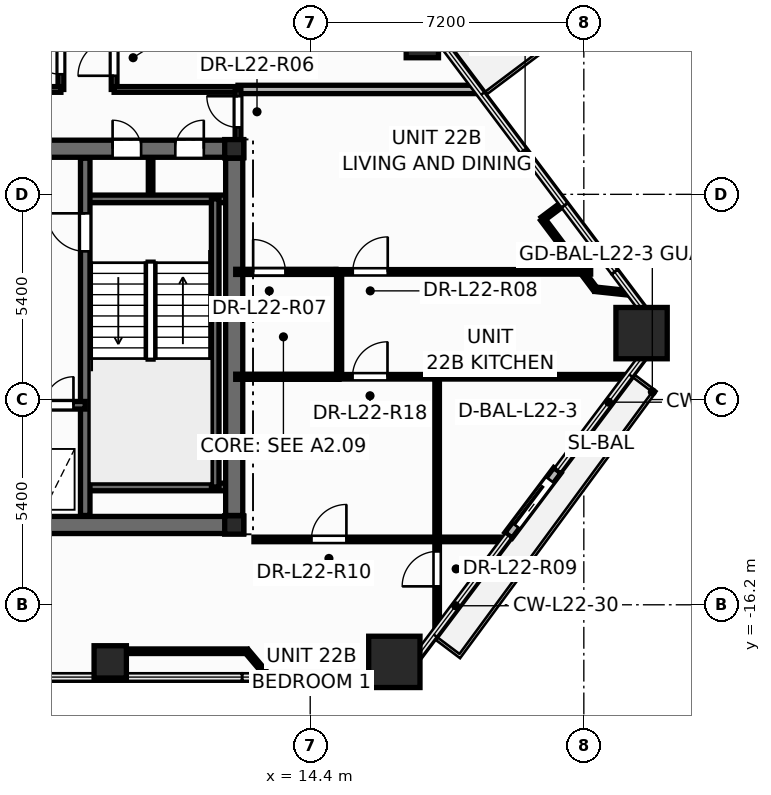
"""IFC4 building model, lengths in metres.
Left out: names, types, materials, properties, quantities, classifications, styles, units other than length and angle.
Written with IfcOpenShell. Run it as: python <this file> out.ifc"""

import sys

from ifc_helpers import new_model, si_unit, direction, frame, frame_2d, origin, origin_2d, place, context, subcontext, project, spatial, rectangle, hollow_rectangle, hollow_circle, i_section, extrude, element, fill, save


model = new_model("IFC4")
c1 = context("Model", 3, precision=1e-05, world=origin(), true_north=direction((0.0, 1.0)))
c2 = subcontext(c1, "Body", "Model", "MODEL_VIEW")
j1 = project(units=[si_unit("LENGTHUNIT", "METRE"), si_unit("PLANEANGLEUNIT", "RADIAN")], contexts=[c1])
p1 = place(None, origin())
s1 = spatial("IfcSite", under=j1, at=p1, CompositionType="ELEMENT")
p2 = place(p1, origin())
s2 = spatial("IfcBuilding", under=s1, at=p2, CompositionType="ELEMENT")
p3 = place(p2, frame((0.0, 0.0, 86.4)))
s3 = spatial("IfcBuildingStorey", under=s2, at=p3, CompositionType="ELEMENT", Elevation=86.4)
for number, where, z_axis, x_axis in (
    (1, (16.614, -17.702, 0.0), (0.0, 0.0, 1.0), (1.0, 0.0, 0.0)),
    (2, (23.119, -9.052, 0.0), (0.0, 0.0, 1.0), (1.0, 0.0, 0.0)),
):
    element("IfcColumn", number, at=place(p3, frame(where, z_axis=z_axis, x_axis=x_axis)), inside=s3, PredefinedType="COLUMN", context=c2, shape_type="SweptSolid", body=[
        extrude(hollow_rectangle(XDim=1.35, YDim=1.35, WallThickness=0.065, at=origin_2d()), origin(), (0.0, 0.0, 1.0), 3.6),
    ])
for number, where, z_axis, x_axis in (
    (3, (9.138, -17.702, 0.0), (0.0, 0.0, 1.0), (1.0, 0.0, 0.0)),
    (4, (17.351, -1.381, 0.0), (0.0, 0.0, 1.0), (1.0, 0.0, 0.0)),
):
    element("IfcColumn", number, at=place(p3, frame(where, z_axis=z_axis, x_axis=x_axis)), inside=s3, PredefinedType="COLUMN", context=c2, shape_type="SweptSolid", body=[
        extrude(hollow_circle(Radius=0.425, WallThickness=0.038, at=origin_2d()), origin(), (0.0, 0.0, 1.0), 3.6),
    ])
for number, where, z_axis, x_axis in (
    (5, (12.4, -14.1, 0.0), (0.0, 0.0, 1.0), (1.0, 0.0, 0.0)),
    (6, (12.4, -4.2, 0.0), (0.0, 0.0, 1.0), (1.0, 0.0, 0.0)),
):
    element("IfcColumn", number, at=place(p3, frame(where, z_axis=z_axis, x_axis=x_axis)), inside=s3, PredefinedType="COLUMN", context=c2, shape_type="SweptSolid", body=[
        extrude(i_section(OverallWidth=0.5, OverallDepth=0.482, WebThickness=0.04, FlangeThickness=0.045, at=origin_2d()), origin(), (0.0, 0.0, 1.0), 3.6),
    ])
p4 = place(p3, frame((19.618, -14.372, -0.015), z_axis=(0.0, 0.0, 1.0), x_axis=(0.601112886626, 0.799164124277, 0.0)))
e7 = element("IfcWall", 7, at=p4, inside=s3, PredefinedType="STANDARD", context=c2, shape_type="SweptSolid", body=[
    extrude(rectangle(XDim=2.14, YDim=0.24, at=frame_2d((1.07, 0.0))), origin(), (0.0, 0.0, 1.0), 2.658),
])
p5 = place(p4, frame((0.32, 0.0, 0.015)))
e8 = element("IfcOpeningElement", 8, at=p5, cuts=e7, PredefinedType="OPENING", context=c2, shape_type="SweptSolid", body=[
    extrude(rectangle(XDim=1.506, YDim=2.204, at=frame_2d((0.75, 1.102))), frame((0.0, 0.13, 0.0), z_axis=(0.0, -1.0, 0.0), x_axis=(1.0, 0.0, 0.0)), (0.0, 0.0, 1.0), 0.26),
])
p6 = place(p3, frame((10.2, -5.52, 0.0), z_axis=(0.0, 0.0, 1.0), x_axis=(0.0, 1.0, 0.0)))
e9 = element("IfcWall", 9, at=p6, inside=s3, PredefinedType="PARTITIONING", context=c2, shape_type="SweptSolid", body=[
    extrude(rectangle(XDim=1.12, YDim=0.12, at=frame_2d((0.56, 0.0))), origin(), (0.0, 0.0, 1.0), 3.28),
])
p7 = place(p3, frame((-12.65, -14.1, 0.0), z_axis=(0.0, 0.0, 1.0), x_axis=(1.0, 0.0, 0.0)))
e10 = element("IfcWall", 10, at=p7, inside=s3, PredefinedType="SHEAR", context=c2, shape_type="SweptSolid", body=[
    extrude(rectangle(XDim=25.3, YDim=0.45, at=frame_2d((12.65, 0.0))), origin(), (0.0, 0.0, 1.0), 3.6),
])
p8 = place(p3, frame((-12.65, -4.2, 0.0), z_axis=(0.0, 0.0, 1.0), x_axis=(1.0, 0.0, 0.0)))
e11 = element("IfcWall", 11, at=p8, inside=s3, PredefinedType="SHEAR", context=c2, shape_type="SweptSolid", body=[
    extrude(rectangle(XDim=25.3, YDim=0.45, at=frame_2d((12.65, 0.0))), origin(), (0.0, 0.0, 1.0), 3.6),
])
p9 = place(p8, frame((1.85, 0.0, 0.0)))
e12 = element("IfcOpeningElement", 12, at=p9, cuts=e11, PredefinedType="OPENING", context=c2, shape_type="SweptSolid", body=[
    extrude(rectangle(XDim=0.756, YDim=2.054, at=frame_2d((0.375, 1.027))), frame((0.0, 0.235, 0.0), z_axis=(0.0, -1.0, 0.0), x_axis=(1.0, 0.0, 0.0)), (0.0, 0.0, 1.0), 0.47),
])
p10 = place(p8, frame((21.85, 0.0, 0.0)))
e13 = element("IfcOpeningElement", 13, at=p10, cuts=e11, PredefinedType="OPENING", context=c2, shape_type="SweptSolid", body=[
    extrude(rectangle(XDim=0.756, YDim=2.054, at=frame_2d((0.375, 1.027))), frame((0.0, 0.235, 0.0), z_axis=(0.0, -1.0, 0.0), x_axis=(1.0, 0.0, 0.0)), (0.0, 0.0, 1.0), 0.47),
])
p11 = place(p8, frame((23.5, 0.0, 0.0)))
e14 = element("IfcOpeningElement", 14, at=p11, cuts=e11, PredefinedType="OPENING", context=c2, shape_type="SweptSolid", body=[
    extrude(rectangle(XDim=0.756, YDim=2.054, at=frame_2d((0.375, 1.027))), frame((0.0, 0.235, 0.0), z_axis=(0.0, -1.0, 0.0), x_axis=(1.0, 0.0, 0.0)), (0.0, 0.0, 1.0), 0.47),
])
p12 = place(p8, frame((5.85, 0.0, 0.0)))
e15 = element("IfcOpeningElement", 15, at=p12, cuts=e11, PredefinedType="OPENING", context=c2, shape_type="SweptSolid", body=[
    extrude(rectangle(XDim=1.006, YDim=2.104, at=frame_2d((0.5, 1.052))), frame((0.0, 0.235, 0.0), z_axis=(0.0, -1.0, 0.0), x_axis=(1.0, 0.0, 0.0)), (0.0, 0.0, 1.0), 0.47),
])
p13 = place(p8, frame((10.35, 0.0, 0.0)))
e16 = element("IfcOpeningElement", 16, at=p13, cuts=e11, PredefinedType="OPENING", context=c2, shape_type="SweptSolid", body=[
    extrude(rectangle(XDim=1.406, YDim=2.154, at=frame_2d((0.7, 1.077))), frame((0.0, 0.235, 0.0), z_axis=(0.0, -1.0, 0.0), x_axis=(1.0, 0.0, 0.0)), (0.0, 0.0, 1.0), 0.47),
])
p14 = place(p8, frame((18.45, 0.0, 0.0)))
e17 = element("IfcOpeningElement", 17, at=p14, cuts=e11, PredefinedType="OPENING", context=c2, shape_type="SweptSolid", body=[
    extrude(rectangle(XDim=1.006, YDim=2.104, at=frame_2d((0.5, 1.052))), frame((0.0, 0.235, 0.0), z_axis=(0.0, -1.0, 0.0), x_axis=(1.0, 0.0, 0.0)), (0.0, 0.0, 1.0), 0.47),
])
for number, where, z_axis, x_axis in (
    (18, (8.48, -5.52, 0.0), (0.0, 0.0, 1.0), (1.0, 0.0, 0.0)),
    (19, (8.48, -13.1, 0.0), (0.0, 0.0, 1.0), (1.0, 0.0, 0.0)),
):
    element("IfcWall", number, at=place(p3, frame(where, z_axis=z_axis, x_axis=x_axis)), inside=s3, PredefinedType="SOLIDWALL", context=c2, shape_type="SweptSolid", body=[
        extrude(rectangle(XDim=3.87, YDim=0.2, at=frame_2d((1.935, 0.0))), origin(), (0.0, 0.0, 1.0), 3.6),
    ])
p15 = place(p3, frame((11.9, -13.1, 0.0), z_axis=(0.0, 0.0, 1.0), x_axis=(0.0, 1.0, 0.0)))
e20 = element("IfcWall", 20, at=p15, inside=s3, PredefinedType="SOLIDWALL", context=c2, shape_type="SweptSolid", body=[
    extrude(rectangle(XDim=7.58, YDim=0.2, at=frame_2d((3.79, 0.0))), origin(), (0.0, 0.0, 1.0), 3.6),
])
p16 = place(p3, frame((8.48, -13.85, 0.0), z_axis=(0.0, 0.0, 1.0), x_axis=(0.0, 1.0, 0.0)))
e21 = element("IfcWall", 21, at=p16, inside=s3, PredefinedType="SHEAR", context=c2, shape_type="SweptSolid", body=[
    extrude(rectangle(XDim=9.4, YDim=0.25, at=frame_2d((4.7, 0.0))), origin(), (0.0, 0.0, 1.0), 3.6),
])
p17 = place(p16, frame((6.95, 0.0, 0.0)))
e22 = element("IfcOpeningElement", 22, at=p17, cuts=e21, PredefinedType="OPENING", context=c2, shape_type="SweptSolid", body=[
    extrude(rectangle(XDim=1.006, YDim=2.104, at=frame_2d((0.5, 1.052))), frame((0.0, 0.135, 0.0), z_axis=(0.0, -1.0, 0.0), x_axis=(1.0, 0.0, 0.0)), (0.0, 0.0, 1.0), 0.27),
])
p18 = place(p3, frame((5.12, -10.95, 0.0), z_axis=(0.0, 0.0, 1.0), x_axis=(1.0, 0.0, 0.0)))
e23 = element("IfcWall", 23, at=p18, inside=s3, PredefinedType="SOLIDWALL", context=c2, shape_type="SweptSolid", body=[
    extrude(rectangle(XDim=3.36, YDim=0.2, at=frame_2d((1.68, 0.0))), origin(), (0.0, 0.0, 1.0), 3.6),
])
p19 = place(p18, frame((0.42, 0.0, 0.0)))
e24 = element("IfcOpeningElement", 24, at=p19, cuts=e23, PredefinedType="OPENING", context=c2, shape_type="SweptSolid", body=[
    extrude(rectangle(XDim=1.106, YDim=2.104, at=frame_2d((0.55, 1.052))), frame((0.0, 0.11, 0.0), z_axis=(0.0, -1.0, 0.0), x_axis=(1.0, 0.0, 0.0)), (0.0, 0.0, 1.0), 0.22),
])
p20 = place(p18, frame((2.3, 0.0, 0.0)))
e25 = element("IfcOpeningElement", 25, at=p20, cuts=e23, PredefinedType="OPENING", context=c2, shape_type="SweptSolid", body=[
    extrude(rectangle(XDim=0.756, YDim=2.054, at=frame_2d((0.375, 1.027))), frame((0.0, 0.11, 0.0), z_axis=(0.0, -1.0, 0.0), x_axis=(1.0, 0.0, 0.0)), (0.0, 0.0, 1.0), 0.22),
])
p21 = place(p3, frame((12.4, -13.85, 0.0), z_axis=(0.0, 0.0, 1.0), x_axis=(0.0, 1.0, 0.0)))
e26 = element("IfcWall", 26, at=p21, inside=s3, PredefinedType="SHEAR", context=c2, shape_type="SweptSolid", body=[
    extrude(rectangle(XDim=9.4, YDim=0.45, at=frame_2d((4.7, 0.0))), origin(), (0.0, 0.0, 1.0), 3.6),
])
p22 = place(p3, frame((9.24, -2.64, 0.0), z_axis=(0.0, 0.0, 1.0), x_axis=(0.0, 1.0, 0.0)))
e27 = element("IfcWall", 27, at=p22, inside=s3, PredefinedType="PARTITIONING", context=c2, shape_type="SweptSolid", body=[
    extrude(rectangle(XDim=12.709, YDim=0.15, at=frame_2d((6.354, 0.0))), origin(), (0.0, 0.0, 1.0), 2.439),
])
p23 = place(p22, frame((0.36, 0.0, 0.0)))
e28 = element("IfcOpeningElement", 28, at=p23, cuts=e27, PredefinedType="OPENING", context=c2, shape_type="SweptSolid", body=[
    extrude(rectangle(XDim=0.956, YDim=2.104, at=frame_2d((0.475, 1.052))), frame((0.0, 0.085, 0.0), z_axis=(0.0, -1.0, 0.0), x_axis=(1.0, 0.0, 0.0)), (0.0, 0.0, 1.0), 0.17),
])
p24 = place(p3, frame((7.84, -2.64, 0.0), z_axis=(0.0, 0.0, 1.0), x_axis=(0.0, 1.0, 0.0)))
e29 = element("IfcWall", 29, at=p24, inside=s3, PredefinedType="PARTITIONING", context=c2, shape_type="SweptSolid", body=[
    extrude(rectangle(XDim=11.3, YDim=0.15, at=frame_2d((5.65, 0.0))), origin(), (0.0, 0.0, 1.0), 2.439),
])
p25 = place(p24, frame((0.4, 0.0, 0.0)))
e30 = element("IfcOpeningElement", 30, at=p25, cuts=e29, PredefinedType="OPENING", context=c2, shape_type="SweptSolid", body=[
    extrude(rectangle(XDim=0.956, YDim=2.104, at=frame_2d((0.475, 1.052))), frame((0.0, 0.085, 0.0), z_axis=(0.0, -1.0, 0.0), x_axis=(1.0, 0.0, 0.0)), (0.0, 0.0, 1.0), 0.17),
])
p26 = place(p3, frame((-7.84, -2.64, 0.0), z_axis=(0.0, 0.0, 1.0), x_axis=(1.0, 0.0, 0.0)))
e31 = element("IfcWall", 31, at=p26, inside=s3, PredefinedType="PARTITIONING", context=c2, shape_type="SweptSolid", body=[
    extrude(rectangle(XDim=15.68, YDim=0.15, at=frame_2d((7.84, 0.0))), origin(), (0.0, 0.0, 1.0), 2.255),
])
p27 = place(p3, frame((15.08, -7.44, 0.0), z_axis=(0.0, 0.0, 1.0), x_axis=(1.0, 0.0, 0.0)))
e32 = element("IfcWall", 32, at=p27, inside=s3, PredefinedType="PARTITIONING", context=c2, shape_type="SweptSolid", body=[
    extrude(rectangle(XDim=6.7, YDim=0.12, at=frame_2d((3.35, 0.0))), origin(), (0.0, 0.0, 1.0), 2.255),
])
p28 = place(p27, frame((0.44, 0.0, 0.0)))
e33 = element("IfcOpeningElement", 33, at=p28, cuts=e32, PredefinedType="OPENING", context=c2, shape_type="SweptSolid", body=[
    extrude(rectangle(XDim=0.926, YDim=2.104, at=frame_2d((0.46, 1.052))), frame((0.0, 0.07, 0.0), z_axis=(0.0, -1.0, 0.0), x_axis=(1.0, 0.0, 0.0)), (0.0, 0.0, 1.0), 0.14),
])
p29 = place(p3, frame((17.74, -16.87, 0.0), z_axis=(0.0, 0.0, 1.0), x_axis=(0.0, 1.0, 0.0)))
e34 = element("IfcWall", 34, at=p29, inside=s3, PredefinedType="PARTITIONING", context=c2, shape_type="SweptSolid", body=[
    extrude(rectangle(XDim=6.67, YDim=0.12, at=frame_2d((3.335, 0.0))), origin(), (0.0, 0.0, 1.0), 2.644),
])
p30 = place(p29, frame((1.155, 0.0, 0.0)))
e35 = element("IfcOpeningElement", 35, at=p30, cuts=e34, PredefinedType="OPENING", context=c2, shape_type="SweptSolid", body=[
    extrude(rectangle(XDim=0.926, YDim=2.104, at=frame_2d((0.46, 1.052))), frame((0.0, 0.07, 0.0), z_axis=(0.0, -1.0, 0.0), x_axis=(1.0, 0.0, 0.0)), (0.0, 0.0, 1.0), 0.14),
])
p31 = place(p3, frame((12.92, -14.48, 0.0), z_axis=(0.0, 0.0, 1.0), x_axis=(1.0, 0.0, 0.0)))
e36 = element("IfcWall", 36, at=p31, inside=s3, PredefinedType="PARTITIONING", context=c2, shape_type="SweptSolid", body=[
    extrude(rectangle(XDim=6.618, YDim=0.12, at=frame_2d((3.309, 0.0))), origin(), (0.0, 0.0, 1.0), 2.644),
])
p32 = place(p31, frame((1.512, 0.0, 0.0)))
e37 = element("IfcOpeningElement", 37, at=p32, cuts=e36, PredefinedType="OPENING", context=c2, shape_type="SweptSolid", body=[
    extrude(rectangle(XDim=0.926, YDim=2.104, at=frame_2d((0.46, 1.052))), frame((0.0, 0.07, 0.0), z_axis=(0.0, -1.0, 0.0), x_axis=(1.0, 0.0, 0.0)), (0.0, 0.0, 1.0), 0.14),
])
p33 = place(p3, frame((12.5, -2.64, 0.0), z_axis=(0.0, 0.0, 1.0), x_axis=(1.0, 0.0, 0.0)))
e38 = element("IfcWall", 38, at=p33, inside=s3, PredefinedType="PARTITIONING", context=c2, shape_type="SweptSolid", body=[
    extrude(rectangle(XDim=6.298, YDim=0.22, at=frame_2d((3.149, 0.0))), origin(), (0.0, 0.0, 1.0), 2.644),
])
p34 = place(p3, frame((17.68, -10.2, 0.0), z_axis=(0.0, 0.0, 1.0), x_axis=(1.0, 0.0, 0.0)))
e39 = element("IfcWall", 39, at=p34, inside=s3, PredefinedType="PARTITIONING", context=c2, shape_type="SweptSolid", body=[
    extrude(rectangle(XDim=5.076, YDim=0.12, at=frame_2d((2.538, 0.0))), origin(), (0.0, 0.0, 1.0), 2.644),
])
p35 = place(p3, frame((9.1, -17.422, 0.0), z_axis=(0.0, 0.0, 1.0), x_axis=(1.0, 0.0, 0.0)))
e40 = element("IfcWall", 40, at=p35, inside=s3, PredefinedType="PARTITIONING", context=c2, shape_type="SweptSolid", body=[
    extrude(rectangle(XDim=3.631, YDim=0.12, at=frame_2d((1.815, 0.0))), origin(), (0.0, 0.0, 1.0), 2.644),
])
p36 = place(p3, frame((9.24, -2.64, 0.0), z_axis=(0.0, 0.0, 1.0), x_axis=(1.0, 0.0, 0.0)))
e41 = element("IfcWall", 41, at=p36, inside=s3, PredefinedType="PARTITIONING", context=c2, shape_type="SweptSolid", body=[
    extrude(rectangle(XDim=3.26, YDim=0.15, at=frame_2d((1.63, 0.0))), origin(), (0.0, 0.0, 1.0), 3.28),
])
p37 = place(p3, frame((12.44, -7.44, 0.0), z_axis=(0.0, 0.0, 1.0), x_axis=(1.0, 0.0, 0.0)))
e42 = element("IfcWall", 42, at=p37, inside=s3, PredefinedType="PARTITIONING", context=c2, shape_type="SweptSolid", body=[
    extrude(rectangle(XDim=2.638, YDim=0.135, at=frame_2d((1.319, 0.0))), origin(), (0.0, 0.0, 1.0), 2.644),
])
p38 = place(p37, frame((0.458, 0.0, 0.0)))
e43 = element("IfcOpeningElement", 43, at=p38, cuts=e42, PredefinedType="OPENING", context=c2, shape_type="SweptSolid", body=[
    extrude(rectangle(XDim=0.856, YDim=2.104, at=frame_2d((0.425, 1.052))), frame((0.0, 0.078, 0.0), z_axis=(0.0, -1.0, 0.0), x_axis=(1.0, 0.0, 0.0)), (0.0, 0.0, 1.0), 0.155),
])
p39 = place(p3, frame((15.16, -10.2, 0.0), z_axis=(0.0, 0.0, 1.0), x_axis=(0.0, 1.0, 0.0)))
e44 = element("IfcWall", 44, at=p39, inside=s3, PredefinedType="PARTITIONING", context=c2, shape_type="SweptSolid", body=[
    extrude(rectangle(XDim=2.76, YDim=0.135, at=frame_2d((1.38, 0.0))), origin(), (0.0, 0.0, 1.0), 3.28),
])
p40 = place(p3, frame((12.44, -10.2, 0.0), z_axis=(0.0, 0.0, 1.0), x_axis=(1.0, 0.0, 0.0)))
e45 = element("IfcWall", 45, at=p40, inside=s3, PredefinedType="PARTITIONING", context=c2, shape_type="SweptSolid", body=[
    extrude(rectangle(XDim=2.72, YDim=0.135, at=frame_2d((1.36, 0.0))), origin(), (0.0, 0.0, 1.0), 2.644),
])
p41 = place(p3, frame((15.16, -10.2, 0.0), z_axis=(0.0, 0.0, 1.0), x_axis=(1.0, 0.0, 0.0)))
e46 = element("IfcWall", 46, at=p41, inside=s3, PredefinedType="PARTITIONING", context=c2, shape_type="SweptSolid", body=[
    extrude(rectangle(XDim=2.518, YDim=0.12, at=frame_2d((1.259, 0.0))), origin(), (0.0, 0.0, 1.0), 3.28),
])
p42 = place(p41, frame((0.354, 0.0, 0.0)))
e47 = element("IfcOpeningElement", 47, at=p42, cuts=e46, PredefinedType="OPENING", context=c2, shape_type="SweptSolid", body=[
    extrude(rectangle(XDim=0.926, YDim=2.104, at=frame_2d((0.46, 1.052))), frame((0.0, 0.07, 0.0), z_axis=(0.0, -1.0, 0.0), x_axis=(1.0, 0.0, 0.0)), (0.0, 0.0, 1.0), 0.14),
])
p43 = place(p3, frame((21.902, -7.898, 0.0), z_axis=(0.0, 0.0, 1.0), x_axis=(-0.601114822283, 0.799162668317, 0.0)))
e48 = element("IfcWall", 48, at=p43, inside=s3, PredefinedType="PARTITIONING", context=c2, shape_type="SweptSolid", body=[
    extrude(rectangle(XDim=2.311, YDim=0.12, at=frame_2d((1.156, 0.0))), origin(), (0.0, 0.0, 1.0), 3.28),
])
p44 = place(p3, frame((12.5, -4.24, 0.0), z_axis=(0.0, 0.0, 1.0), x_axis=(0.0, 1.0, 0.0)))
e49 = element("IfcWall", 49, at=p44, inside=s3, PredefinedType="PARTITIONING", context=c2, shape_type="SweptSolid", body=[
    extrude(rectangle(XDim=1.6, YDim=0.15, at=frame_2d((0.8, 0.0))), origin(), (0.0, 0.0, 1.0), 2.255),
])
p45 = place(p44, frame((0.602, 0.0, 0.0)))
e50 = element("IfcOpeningElement", 50, at=p45, cuts=e49, PredefinedType="OPENING", context=c2, shape_type="SweptSolid", body=[
    extrude(rectangle(XDim=0.826, YDim=2.104, at=frame_2d((0.41, 1.052))), frame((0.0, 0.085, 0.0), z_axis=(0.0, -1.0, 0.0), x_axis=(1.0, 0.0, 0.0)), (0.0, 0.0, 1.0), 0.17),
])
p46 = place(p3, frame((12.731, -17.422, 0.0), z_axis=(0.0, 0.0, 1.0), x_axis=(0.644692996289, -0.764441587393, 0.0)))
e51 = element("IfcWall", 51, at=p46, inside=s3, PredefinedType="PARTITIONING", context=c2, shape_type="SweptSolid", body=[
    extrude(rectangle(XDim=0.877, YDim=0.12, at=frame_2d((0.438, 0.0))), origin(), (0.0, 0.0, 1.0), 2.644),
])
p47 = place(p3, frame((22.746, -7.988, 0.0), z_axis=(0.0, 0.0, 1.0), x_axis=(-0.99437860496, 0.10588290701, 0.0)))
e52 = element("IfcWall", 52, at=p47, inside=s3, PredefinedType="PARTITIONING", context=c2, shape_type="SweptSolid", body=[
    extrude(rectangle(XDim=0.849, YDim=0.12, at=frame_2d((0.424, 0.0))), origin(), (0.0, 0.0, 1.0), 2.644),
])
for number, where, z_axis, x_axis in (
    (53, (20.512, -6.051, 0.0), (0.0, 0.0, 1.0), (0.799, 0.601, 0.0)),
    (54, (9.1, -18.092, 0.0), (0.0, 0.0, 1.0), (0.0, 1.0, 0.0)),
):
    element("IfcWall", number, at=place(p3, frame(where, z_axis=z_axis, x_axis=x_axis)), inside=s3, PredefinedType="PARTITIONING", context=c2, shape_type="SweptSolid", body=[
        extrude(rectangle(XDim=0.67, YDim=0.12, at=frame_2d((0.335, 0.0))), origin(), (0.0, 0.0, 1.0), 2.644),
    ])
p48 = place(p5, origin())
e55 = element("IfcDoor", 55, at=p48, inside=s3, OperationType="SLIDING_TO_RIGHT", PredefinedType="DOOR", context=c2, shape_type="SweptSolid", body=[
    extrude(rectangle(XDim=1.5, YDim=2.2, at=frame_2d((0.75, 1.1))), frame((0.0, 0.025, 0.0), z_axis=(0.0, -1.0, 0.0), x_axis=(1.0, 0.0, 0.0)), (0.0, 0.0, 1.0), 0.05),
])
fill(e8, e55)
p49 = place(p17, origin())
e56 = element("IfcDoor", 56, at=p49, inside=s3, OperationType="SINGLE_SWING_RIGHT", PredefinedType="DOOR", context=c2, shape_type="SweptSolid", body=[
    extrude(rectangle(XDim=1.0, YDim=2.1, at=frame_2d((0.5, 1.05))), frame((0.0, 0.025, 0.0), z_axis=(0.0, -1.0, 0.0), x_axis=(1.0, 0.0, 0.0)), (0.0, 0.0, 1.0), 0.05),
])
fill(e22, e56)
p50 = place(p20, origin())
e57 = element("IfcDoor", 57, at=p50, inside=s3, OperationType="SINGLE_SWING_RIGHT", PredefinedType="DOOR", context=c2, shape_type="SweptSolid", body=[
    extrude(rectangle(XDim=0.75, YDim=2.05, at=frame_2d((0.375, 1.025))), frame((0.0, 0.025, 0.0), z_axis=(0.0, -1.0, 0.0), x_axis=(1.0, 0.0, 0.0)), (0.0, 0.0, 1.0), 0.05),
])
fill(e25, e57)
p51 = place(p10, origin())
e58 = element("IfcDoor", 58, at=p51, inside=s3, OperationType="SINGLE_SWING_LEFT", PredefinedType="DOOR", context=c2, shape_type="SweptSolid", body=[
    extrude(rectangle(XDim=0.75, YDim=2.05, at=frame_2d((0.375, 1.025))), frame((0.0, 0.025, 0.0), z_axis=(0.0, -1.0, 0.0), x_axis=(1.0, 0.0, 0.0)), (0.0, 0.0, 1.0), 0.05),
])
fill(e13, e58)
p52 = place(p11, origin())
e59 = element("IfcDoor", 59, at=p52, inside=s3, OperationType="SINGLE_SWING_RIGHT", PredefinedType="DOOR", context=c2, shape_type="SweptSolid", body=[
    extrude(rectangle(XDim=0.75, YDim=2.05, at=frame_2d((0.375, 1.025))), frame((0.0, 0.025, 0.0), z_axis=(0.0, -1.0, 0.0), x_axis=(1.0, 0.0, 0.0)), (0.0, 0.0, 1.0), 0.05),
])
fill(e14, e59)
p53 = place(p45, origin())
e60 = element("IfcDoor", 60, at=p53, inside=s3, OperationType="SINGLE_SWING_RIGHT", PredefinedType="DOOR", context=c2, shape_type="SweptSolid", body=[
    extrude(rectangle(XDim=0.82, YDim=2.1, at=frame_2d((0.41, 1.05))), frame((0.0, 0.025, 0.0), z_axis=(0.0, -1.0, 0.0), x_axis=(1.0, 0.0, 0.0)), (0.0, 0.0, 1.0), 0.05),
])
fill(e50, e60)
p54 = place(p38, origin())
e61 = element("IfcDoor", 61, at=p54, inside=s3, OperationType="SINGLE_SWING_LEFT", PredefinedType="DOOR", context=c2, shape_type="SweptSolid", body=[
    extrude(rectangle(XDim=0.85, YDim=2.1, at=frame_2d((0.425, 1.05))), frame((0.0, 0.025, 0.0), z_axis=(0.0, -1.0, 0.0), x_axis=(1.0, 0.0, 0.0)), (0.0, 0.0, 1.0), 0.05),
])
fill(e43, e61)
p55 = place(p28, origin())
e62 = element("IfcDoor", 62, at=p55, inside=s3, OperationType="SINGLE_SWING_RIGHT", PredefinedType="DOOR", context=c2, shape_type="SweptSolid", body=[
    extrude(rectangle(XDim=0.92, YDim=2.1, at=frame_2d((0.46, 1.05))), frame((0.0, 0.025, 0.0), z_axis=(0.0, -1.0, 0.0), x_axis=(1.0, 0.0, 0.0)), (0.0, 0.0, 1.0), 0.05),
])
fill(e33, e62)
p56 = place(p30, origin())
e63 = element("IfcDoor", 63, at=p56, inside=s3, OperationType="SINGLE_SWING_LEFT", PredefinedType="DOOR", context=c2, shape_type="SweptSolid", body=[
    extrude(rectangle(XDim=0.92, YDim=2.1, at=frame_2d((0.46, 1.05))), frame((0.0, 0.025, 0.0), z_axis=(0.0, -1.0, 0.0), x_axis=(1.0, 0.0, 0.0)), (0.0, 0.0, 1.0), 0.05),
])
fill(e35, e63)
p57 = place(p32, origin())
e64 = element("IfcDoor", 64, at=p57, inside=s3, OperationType="SINGLE_SWING_RIGHT", PredefinedType="DOOR", context=c2, shape_type="SweptSolid", body=[
    extrude(rectangle(XDim=0.92, YDim=2.1, at=frame_2d((0.46, 1.05))), frame((0.0, 0.025, 0.0), z_axis=(0.0, -1.0, 0.0), x_axis=(1.0, 0.0, 0.0)), (0.0, 0.0, 1.0), 0.05),
])
fill(e37, e64)
p58 = place(p25, origin())
e65 = element("IfcDoor", 65, at=p58, inside=s3, OperationType="SINGLE_SWING_RIGHT", PredefinedType="DOOR", context=c2, shape_type="SweptSolid", body=[
    extrude(rectangle(XDim=0.95, YDim=2.1, at=frame_2d((0.475, 1.05))), frame((0.0, 0.025, 0.0), z_axis=(0.0, -1.0, 0.0), x_axis=(1.0, 0.0, 0.0)), (0.0, 0.0, 1.0), 0.05),
])
fill(e30, e65)
p59 = place(p23, origin())
e66 = element("IfcDoor", 66, at=p59, inside=s3, OperationType="SINGLE_SWING_LEFT", PredefinedType="DOOR", context=c2, shape_type="SweptSolid", body=[
    extrude(rectangle(XDim=0.95, YDim=2.1, at=frame_2d((0.475, 1.05))), frame((0.0, 0.025, 0.0), z_axis=(0.0, -1.0, 0.0), x_axis=(1.0, 0.0, 0.0)), (0.0, 0.0, 1.0), 0.05),
])
fill(e28, e66)
p60 = place(p42, origin())
e67 = element("IfcDoor", 67, at=p60, inside=s3, OperationType="SINGLE_SWING_RIGHT", PredefinedType="DOOR", context=c2, shape_type="SweptSolid", body=[
    extrude(rectangle(XDim=0.92, YDim=2.1, at=frame_2d((0.46, 1.05))), frame((0.0, 0.025, 0.0), z_axis=(0.0, -1.0, 0.0), x_axis=(1.0, 0.0, 0.0)), (0.0, 0.0, 1.0), 0.05),
])
fill(e47, e67)
save(model, sys.argv[1])
